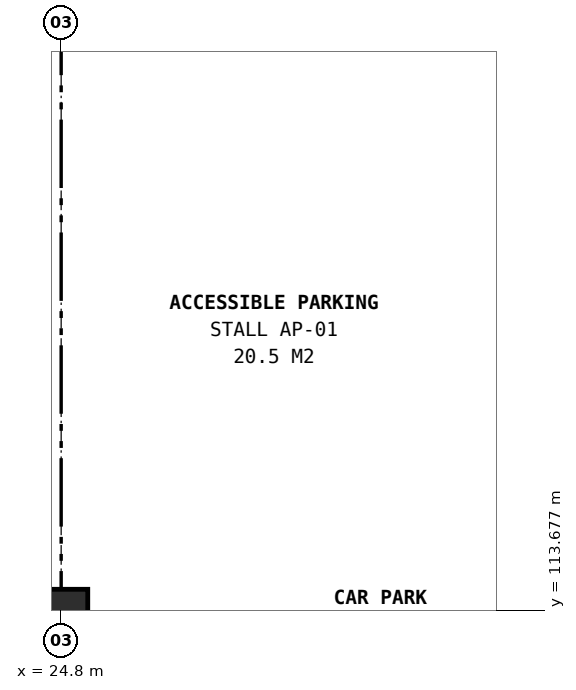
"""IFC4 building model, lengths in metres.
Left out: names, types, materials, properties, quantities, classifications, styles, units other than length and angle.
Written with IfcOpenShell. Run it as: python <this file> out.ifc"""

import sys

from ifc_helpers import new_model, si_unit, direction, frame, origin, origin_2d, place, context, subcontext, project, spatial, rectangle, extrude, element, save


model = new_model("IFC4")
c1 = context("Model", 3, precision=1e-05, world=origin(), true_north=direction((0.0, 1.0)))
c2 = subcontext(c1, "Body", "Model", "MODEL_VIEW")
j1 = project(units=[si_unit("LENGTHUNIT", "METRE"), si_unit("PLANEANGLEUNIT", "RADIAN")], contexts=[c1])
p1 = place(None, origin())
s1 = spatial("IfcSite", under=j1, at=p1, CompositionType="ELEMENT")
p2 = place(p1, origin())
s2 = spatial("IfcBuilding", under=s1, at=p2, CompositionType="ELEMENT")
p3 = place(p2, frame((0.0, 0.0, -4.5)))
s3 = spatial("IfcBuildingStorey", under=s2, at=p3, CompositionType="ELEMENT", Elevation=-4.5)
p4 = place(p3, frame((24.8, 113.6, 0.0), z_axis=(0.0, 0.0, 1.0), x_axis=(1.0, 0.0, 0.0)))
e1 = element("IfcColumn", 1, at=p4, inside=s3, PredefinedType="COLUMN", context=c2, shape_type="SweptSolid", body=[
    extrude(rectangle(XDim=0.7, YDim=0.7, at=origin_2d()), origin(), (0.0, 0.0, 1.0), 4.5),
])
save(model, sys.argv[1])
